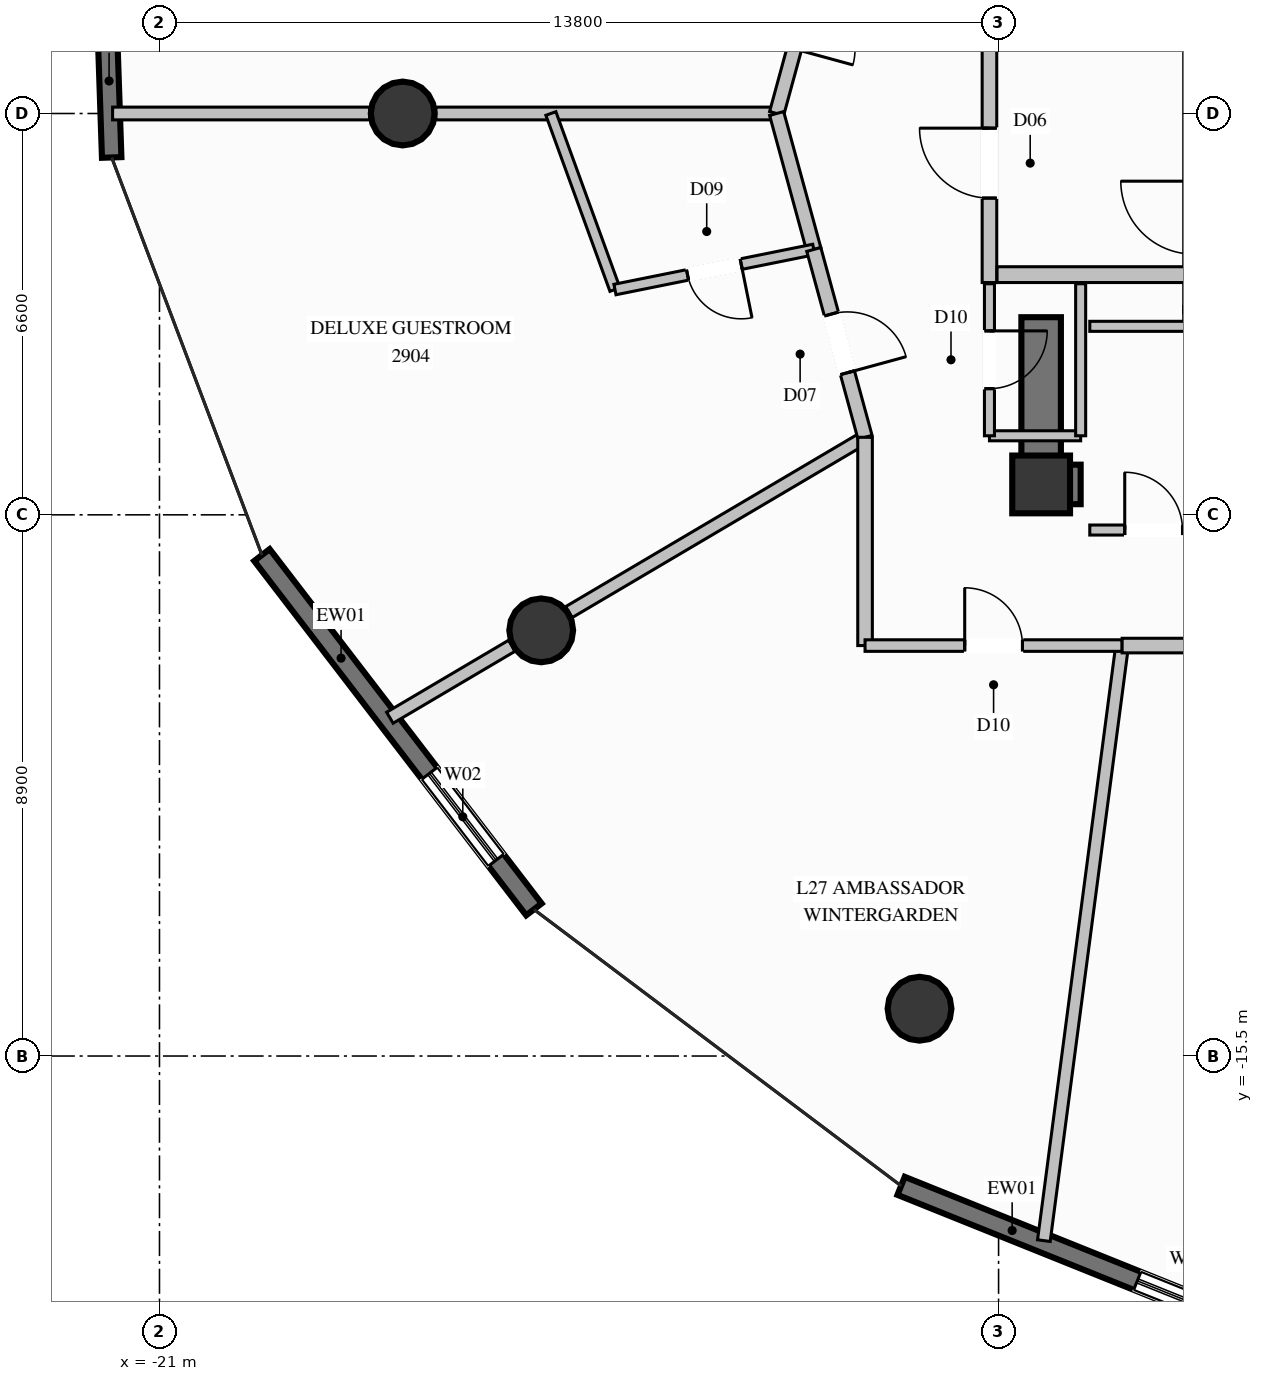
"""IFC4 building model, lengths in metres.
Left out: names, types, materials, properties, quantities, classifications, styles, units other than length and angle.
Written with IfcOpenShell. Run it as: python <this file> out.ifc"""

import sys

from ifc_helpers import new_model, si_unit, direction, frame, frame_2d, origin, origin_2d, place, context, subcontext, project, spatial, rectangle, circle, extrude, element, fill, save


model = new_model("IFC4")
c1 = context("Model", 3, precision=1e-05, world=origin(), true_north=direction((0.0, 1.0)))
c2 = subcontext(c1, "Body", "Model", "MODEL_VIEW")
j1 = project(units=[si_unit("LENGTHUNIT", "METRE"), si_unit("PLANEANGLEUNIT", "RADIAN")], contexts=[c1])
p1 = place(None, origin())
s1 = spatial("IfcSite", under=j1, at=p1, CompositionType="ELEMENT")
p2 = place(p1, origin())
s2 = spatial("IfcBuilding", under=s1, at=p2, CompositionType="ELEMENT")
p3 = place(p2, frame((0.0, 0.0, 109.8)))
s3 = spatial("IfcBuildingStorey", under=s2, at=p3, CompositionType="ELEMENT", Elevation=109.8)
p4 = place(p3, frame((-6.5, -6.1, 0.0), z_axis=(0.0, 0.0, 1.0), x_axis=(1.0, 0.0, 0.0)))
e1 = element("IfcColumn", 1, at=p4, inside=s3, PredefinedType="COLUMN", context=c2, shape_type="SweptSolid", body=[
    extrude(rectangle(XDim=0.95, YDim=0.95, at=origin_2d()), origin(), (0.0, 0.0, 1.0), 3.6),
])
p5 = place(p3, frame((-6.175, -6.1, 0.0), z_axis=(0.0, 0.0, 1.0), x_axis=(1.0, 0.0, 0.0)))
e2 = element("IfcWall", 2, at=p5, inside=s3, PredefinedType="SHEAR", context=c2, shape_type="SweptSolid", body=[
    extrude(rectangle(XDim=0.325, YDim=0.65, at=frame_2d((0.163, 0.0))), origin(), (0.0, 0.0, 1.0), 3.6),
])
p6 = place(p3, frame((-6.5, -6.425, 0.0), z_axis=(0.0, 0.0, 1.0), x_axis=(0.0, 1.0, 0.0)))
e3 = element("IfcWall", 3, at=p6, inside=s3, PredefinedType="SHEAR", context=c2, shape_type="SweptSolid", body=[
    extrude(rectangle(XDim=3.075, YDim=0.65, at=frame_2d((1.538, 0.0))), origin(), (0.0, 0.0, 1.0), 3.6),
])
for number, where, z_axis, x_axis in (
    (4, (-17.0, 0.0, 0.0), (0.0, 0.0, 1.0), (1.0, 0.0, 0.0)),
    (5, (-14.722, -8.5, 0.0), (0.0, 0.0, 1.0), (1.0, 0.0, 0.0)),
    (6, (-8.5, -14.722, 0.0), (0.0, 0.0, 1.0), (1.0, 0.0, 0.0)),
):
    element("IfcColumn", number, at=place(p3, frame(where, z_axis=z_axis, x_axis=x_axis)), inside=s3, PredefinedType="COLUMN", context=c2, shape_type="SweptSolid", body=[
        extrude(circle(Radius=0.525, at=origin_2d()), origin(), (0.0, 0.0, 1.0), 3.6),
    ])
p7 = place(p3, frame((-21.786, -0.723, 0.0), z_axis=(0.0, 0.0, 1.0), x_axis=(-0.034040106065, 0.999420467661, 0.0)))
e7 = element("IfcWall", 7, at=p7, inside=s3, PredefinedType="SOLIDWALL", context=c2, shape_type="SweptSolid", body=[
    extrude(rectangle(XDim=6.613, YDim=0.32, at=frame_2d((3.306, 0.0))), origin(), (0.0, 0.0, 1.0), 3.35),
])
p8 = place(p7, frame((2.767, 0.0, 0.35)))
e8 = element("IfcOpeningElement", 8, at=p8, cuts=e7, PredefinedType="OPENING", context=c2, shape_type="SweptSolid", body=[
    extrude(rectangle(XDim=1.8, YDim=2.6, at=frame_2d((0.9, 1.3))), frame((0.0, 0.17, 0.0), z_axis=(0.0, -1.0, 0.0), x_axis=(1.0, 0.0, 0.0)), (0.0, 0.0, 1.0), 0.34),
])
p9 = place(p3, frame((-14.842, -13.089, 0.0), z_axis=(0.0, 0.0, 1.0), x_axis=(-0.608831916989, 0.793299247986, 0.0)))
e9 = element("IfcWall", 9, at=p9, inside=s3, PredefinedType="SOLIDWALL", context=c2, shape_type="SweptSolid", body=[
    extrude(rectangle(XDim=7.347, YDim=0.32, at=frame_2d((3.673, 0.0))), origin(), (0.0, 0.0, 1.0), 3.35),
])
p10 = place(p9, frame((1.021, 0.0, 0.35)))
e10 = element("IfcOpeningElement", 10, at=p10, cuts=e9, PredefinedType="OPENING", context=c2, shape_type="SweptSolid", body=[
    extrude(rectangle(XDim=1.8, YDim=2.6, at=frame_2d((0.9, 1.3))), frame((0.0, 0.17, 0.0), z_axis=(0.0, -1.0, 0.0), x_axis=(1.0, 0.0, 0.0)), (0.0, 0.0, 1.0), 0.34),
])
p11 = place(p3, frame((-1.79, -20.455, 0.0), z_axis=(0.0, 0.0, 1.0), x_axis=(-0.927795739468, 0.373088549577, 0.0)))
e11 = element("IfcWall", 11, at=p11, inside=s3, PredefinedType="SOLIDWALL", context=c2, shape_type="SweptSolid", body=[
    extrude(rectangle(XDim=7.559, YDim=0.32, at=frame_2d((3.779, 0.0))), origin(), (0.0, 0.0, 1.0), 3.35),
])
p12 = place(p11, frame((1.572, 0.0, 0.35)))
e12 = element("IfcOpeningElement", 12, at=p12, cuts=e11, PredefinedType="OPENING", context=c2, shape_type="SweptSolid", body=[
    extrude(rectangle(XDim=1.8, YDim=2.6, at=frame_2d((0.9, 1.3))), frame((0.0, 0.17, 0.0), z_axis=(0.0, -1.0, 0.0), x_axis=(1.0, 0.0, 0.0)), (0.0, 0.0, 1.0), 0.34),
])
p13 = place(p3, frame((-7.35, -2.78, 0.0), z_axis=(0.0, 0.0, 1.0), x_axis=(0.0, 1.0, 0.0)))
e13 = element("IfcWall", 13, at=p13, inside=s3, PredefinedType="PARTITIONING", context=c2, shape_type="SweptSolid", body=[
    extrude(rectangle(XDim=5.12, YDim=0.24, at=frame_2d((2.56, 0.0))), origin(), (0.0, 0.0, 1.0), 2.435),
])
p14 = place(p13, frame((1.389, 0.0, 0.0)))
e14 = element("IfcOpeningElement", 14, at=p14, cuts=e13, PredefinedType="OPENING", context=c2, shape_type="SweptSolid", body=[
    extrude(rectangle(XDim=1.15, YDim=2.2, at=frame_2d((0.575, 1.1))), frame((0.0, 0.13, 0.0), z_axis=(0.0, -1.0, 0.0), x_axis=(1.0, 0.0, 0.0)), (0.0, 0.0, 1.0), 0.26),
])
p15 = place(p3, frame((-7.225, -2.65, 0.0), z_axis=(0.0, 0.0, 1.0), x_axis=(1.0, 0.0, 0.0)))
e15 = element("IfcWall", 15, at=p15, inside=s3, PredefinedType="PARTITIONING", context=c2, shape_type="SweptSolid", body=[
    extrude(rectangle(XDim=3.095, YDim=0.26, at=frame_2d((1.548, 0.0))), origin(), (0.0, 0.0, 1.0), 3.35),
])
p16 = place(p3, frame((-7.35, -5.3, 0.0), z_axis=(0.0, 0.0, 1.0), x_axis=(1.0, 0.0, 0.0)))
e16 = element("IfcWall", 16, at=p16, inside=s3, PredefinedType="PARTITIONING", context=c2, shape_type="SweptSolid", body=[
    extrude(rectangle(XDim=1.5, YDim=0.165, at=frame_2d((0.75, 0.0))), origin(), (0.0, 0.0, 1.0), 2.435),
])
p17 = place(p3, frame((-5.85, -5.3, 0.0), z_axis=(0.0, 0.0, 1.0), x_axis=(0.0, 1.0, 0.0)))
e17 = element("IfcWall", 17, at=p17, inside=s3, PredefinedType="PARTITIONING", context=c2, shape_type="SweptSolid", body=[
    extrude(rectangle(XDim=2.5, YDim=0.165, at=frame_2d((1.25, 0.0))), origin(), (0.0, 0.0, 1.0), 2.435),
])
p18 = place(p3, frame((-7.35, -2.8, 0.0), z_axis=(0.0, 0.0, 1.0), x_axis=(0.0, -1.0, 0.0)))
e18 = element("IfcWall", 18, at=p18, inside=s3, PredefinedType="PARTITIONING", context=c2, shape_type="SweptSolid", body=[
    extrude(rectangle(XDim=2.5, YDim=0.165, at=frame_2d((1.25, 0.0))), origin(), (0.0, 0.0, 1.0), 3.35),
])
p19 = place(p18, frame((0.775, 0.0, 0.0)))
e19 = element("IfcOpeningElement", 19, at=p19, cuts=e18, PredefinedType="OPENING", context=c2, shape_type="SweptSolid", body=[
    extrude(rectangle(XDim=0.95, YDim=2.1, at=frame_2d((0.475, 1.05))), frame((0.0, 0.093, 0.0), z_axis=(0.0, -1.0, 0.0), x_axis=(1.0, 0.0, 0.0)), (0.0, 0.0, 1.0), 0.185),
])
p20 = place(p3, frame((-5.7, -6.85, 0.0), z_axis=(0.0, 0.0, 1.0), x_axis=(1.0, 0.0, 0.0)))
e20 = element("IfcWall", 20, at=p20, inside=s3, PredefinedType="PARTITIONING", context=c2, shape_type="SweptSolid", body=[
    extrude(rectangle(XDim=2.1, YDim=0.165, at=frame_2d((1.05, 0.0))), origin(), (0.0, 0.0, 1.0), 2.435),
])
p21 = place(p20, frame((0.575, 0.0, 0.0)))
e21 = element("IfcOpeningElement", 21, at=p21, cuts=e20, PredefinedType="OPENING", context=c2, shape_type="SweptSolid", body=[
    extrude(rectangle(XDim=0.95, YDim=2.1, at=frame_2d((0.475, 1.05))), frame((0.0, 0.093, 0.0), z_axis=(0.0, -1.0, 0.0), x_axis=(1.0, 0.0, 0.0)), (0.0, 0.0, 1.0), 0.185),
])
p22 = place(p3, frame((-3.6, -3.5, 0.0), z_axis=(0.0, 0.0, 1.0), x_axis=(-1.0, 0.0, 0.0)))
e22 = element("IfcWall", 22, at=p22, inside=s3, PredefinedType="PARTITIONING", context=c2, shape_type="SweptSolid", body=[
    extrude(rectangle(XDim=2.1, YDim=0.165, at=frame_2d((1.05, 0.0))), origin(), (0.0, 0.0, 1.0), 3.35),
])
p23 = place(p3, frame((-10.85, 0.0, 0.0), z_axis=(0.0, 0.0, 1.0), x_axis=(-1.0, 0.0, 0.0)))
e23 = element("IfcWall", 23, at=p23, inside=s3, PredefinedType="PARTITIONING", context=c2, shape_type="SweptSolid", body=[
    extrude(rectangle(XDim=5.605, YDim=0.21, at=frame_2d((2.802, 0.0))), origin(), (0.0, 0.0, 1.0), 3.35),
])
p24 = place(p3, frame((-17.545, 0.0, 0.0), z_axis=(0.0, 0.0, 1.0), x_axis=(-1.0, 0.0, 0.0)))
e24 = element("IfcWall", 24, at=p24, inside=s3, PredefinedType="PARTITIONING", context=c2, shape_type="SweptSolid", body=[
    extrude(rectangle(XDim=4.226, YDim=0.21, at=frame_2d((2.113, 0.0))), origin(), (0.0, 0.0, 1.0), 3.35),
])
p25 = place(p3, frame((-9.396, -5.325, 0.0), z_axis=(0.0, 0.0, 1.0), x_axis=(-0.861187639937, -0.508287171607, 0.0)))
e25 = element("IfcWall", 25, at=p25, inside=s3, PredefinedType="PARTITIONING", context=c2, shape_type="SweptSolid", body=[
    extrude(rectangle(XDim=5.656, YDim=0.21, at=frame_2d((2.828, 0.0))), origin(), (0.0, 0.0, 1.0), 2.791),
])
p26 = place(p3, frame((-15.205, -8.753, 0.0), z_axis=(0.0, 0.0, 1.0), x_axis=(-0.861151801863, -0.508347886932, 0.0)))
e26 = element("IfcWall", 26, at=p26, inside=s3, PredefinedType="PARTITIONING", context=c2, shape_type="SweptSolid", body=[
    extrude(rectangle(XDim=2.329, YDim=0.21, at=frame_2d((1.165, 0.0))), origin(), (0.0, 0.0, 1.0), 3.35),
])
p27 = place(p3, frame((-10.007, 3.089, 0.0), z_axis=(0.0, 0.0, 1.0), x_axis=(-0.263272237376, -0.964721581093, 0.0)))
e27 = element("IfcWall", 27, at=p27, inside=s3, PredefinedType="PARTITIONING", context=c2, shape_type="SweptSolid", body=[
    extrude(rectangle(XDim=3.202, YDim=0.24, at=frame_2d((1.601, 0.0))), origin(), (0.0, 0.0, 1.0), 3.35),
])
p28 = place(p27, frame((1.101, 0.0, 0.0)))
e28 = element("IfcOpeningElement", 28, at=p28, cuts=e27, PredefinedType="OPENING", context=c2, shape_type="SweptSolid", body=[
    extrude(rectangle(XDim=1.0, YDim=2.2, at=frame_2d((0.5, 1.1))), frame((0.0, 0.13, 0.0), z_axis=(0.0, -1.0, 0.0), x_axis=(1.0, 0.0, 0.0)), (0.0, 0.0, 1.0), 0.26),
])
p29 = place(p3, frame((-10.85, 0.0, 0.0), z_axis=(0.0, 0.0, 1.0), x_axis=(0.263616426241, -0.964627586074, 0.0)))
e29 = element("IfcWall", 29, at=p29, inside=s3, PredefinedType="PARTITIONING", context=c2, shape_type="SweptSolid", body=[
    extrude(rectangle(XDim=2.318, YDim=0.24, at=frame_2d((1.159, 0.0))), origin(), (0.0, 0.0, 1.0), 3.35),
])
p30 = place(p3, frame((-14.563, 0.0, 0.0), z_axis=(0.0, 0.0, 1.0), x_axis=(0.342092982083, -0.939666106449, 0.0)))
e30 = element("IfcWall", 30, at=p30, inside=s3, PredefinedType="PLUMBINGWALL", context=c2, shape_type="SweptSolid", body=[
    extrude(rectangle(XDim=3.081, YDim=0.175, at=frame_2d((1.541, 0.0))), origin(), (0.0, 0.0, 1.0), 3.35),
])
p31 = place(p3, frame((-10.239, -2.236, 0.0), z_axis=(0.0, 0.0, 1.0), x_axis=(-0.980295333609, -0.197537487338, 0.0)))
e31 = element("IfcWall", 31, at=p31, inside=s3, PredefinedType="PLUMBINGWALL", context=c2, shape_type="SweptSolid", body=[
    extrude(rectangle(XDim=3.336, YDim=0.175, at=frame_2d((1.668, 0.0))), origin(), (0.0, 0.0, 1.0), 3.35),
])
p32 = place(p31, frame((1.218, 0.0, 0.0)))
e32 = element("IfcOpeningElement", 32, at=p32, cuts=e31, PredefinedType="OPENING", context=c2, shape_type="SweptSolid", body=[
    extrude(rectangle(XDim=0.9, YDim=2.1, at=frame_2d((0.45, 1.05))), frame((0.0, 0.098, 0.0), z_axis=(0.0, -1.0, 0.0), x_axis=(1.0, 0.0, 0.0)), (0.0, 0.0, 1.0), 0.195),
])
p33 = place(p3, frame((-10.239, -2.236, 0.0), z_axis=(0.0, 0.0, 1.0), x_axis=(0.26329160366, -0.964716295831, 0.0)))
e33 = element("IfcWall", 33, at=p33, inside=s3, PredefinedType="PARTITIONING", context=c2, shape_type="SweptSolid", body=[
    extrude(rectangle(XDim=3.202, YDim=0.24, at=frame_2d((1.601, 0.0))), origin(), (0.0, 0.0, 1.0), 3.35),
])
p34 = place(p33, frame((1.101, 0.0, 0.0)))
e34 = element("IfcOpeningElement", 34, at=p34, cuts=e33, PredefinedType="OPENING", context=c2, shape_type="SweptSolid", body=[
    extrude(rectangle(XDim=1.0, YDim=2.2, at=frame_2d((0.5, 1.1))), frame((0.0, 0.13, 0.0), z_axis=(0.0, -1.0, 0.0), x_axis=(1.0, 0.0, 0.0)), (0.0, 0.0, 1.0), 0.26),
])
p35 = place(p3, frame((-5.168, -8.75, 0.0), z_axis=(0.0, 0.0, 1.0), x_axis=(-0.130403964366, -0.991460945311, 0.0)))
e35 = element("IfcWall", 35, at=p35, inside=s3, PredefinedType="PARTITIONING", context=c2, shape_type="SweptSolid", body=[
    extrude(rectangle(XDim=9.87, YDim=0.21, at=frame_2d((4.935, 0.0))), origin(), (0.0, 0.0, 1.0), 3.35),
])
p36 = place(p3, frame((-9.396, -5.325, 0.0), z_axis=(0.0, 0.0, 1.0), x_axis=(0.0, -1.0, 0.0)))
e36 = element("IfcWall", 36, at=p36, inside=s3, PredefinedType="PARTITIONING", context=c2, shape_type="SweptSolid", body=[
    extrude(rectangle(XDim=3.425, YDim=0.24, at=frame_2d((1.712, 0.0))), origin(), (0.0, 0.0, 1.0), 3.35),
])
p37 = place(p3, frame((-9.396, -8.75, 0.0), z_axis=(0.0, 0.0, 1.0), x_axis=(1.0, 0.0, 0.0)))
e37 = element("IfcWall", 37, at=p37, inside=s3, PredefinedType="PARTITIONING", context=c2, shape_type="SweptSolid", body=[
    extrude(rectangle(XDim=4.228, YDim=0.19, at=frame_2d((2.114, 0.0))), origin(), (0.0, 0.0, 1.0), 3.35),
])
p38 = place(p37, frame((1.639, 0.0, 0.0)))
e38 = element("IfcOpeningElement", 38, at=p38, cuts=e37, PredefinedType="OPENING", context=c2, shape_type="SweptSolid", body=[
    extrude(rectangle(XDim=0.95, YDim=2.1, at=frame_2d((0.475, 1.05))), frame((0.0, 0.105, 0.0), z_axis=(0.0, -1.0, 0.0), x_axis=(1.0, 0.0, 0.0)), (0.0, 0.0, 1.0), 0.21),
])
p39 = place(p3, frame((-5.168, -8.75, 0.0), z_axis=(0.0, 0.0, 1.0), x_axis=(1.0, 0.0, 0.0)))
e39 = element("IfcWall", 39, at=p39, inside=s3, PredefinedType="PARTITIONING", context=c2, shape_type="SweptSolid", body=[
    extrude(rectangle(XDim=5.168, YDim=0.24, at=frame_2d((2.584, 0.0))), origin(), (0.0, 0.0, 1.0), 3.35),
])
p40 = place(p10, origin())
e40 = element("IfcWindow", 40, at=p40, inside=s3, PartitioningType="SINGLE_PANEL", PredefinedType="WINDOW", context=c2, shape_type="SweptSolid", body=[
    extrude(rectangle(XDim=1.8, YDim=2.6, at=frame_2d((0.9, 1.3))), frame((0.0, 0.03, 0.0), z_axis=(0.0, -1.0, 0.0), x_axis=(1.0, 0.0, 0.0)), (0.0, 0.0, 1.0), 0.06),
])
fill(e10, e40)
p41 = place(p12, origin())
e41 = element("IfcWindow", 41, at=p41, inside=s3, PartitioningType="SINGLE_PANEL", PredefinedType="WINDOW", context=c2, shape_type="SweptSolid", body=[
    extrude(rectangle(XDim=1.8, YDim=2.6, at=frame_2d((0.9, 1.3))), frame((0.0, 0.03, 0.0), z_axis=(0.0, -1.0, 0.0), x_axis=(1.0, 0.0, 0.0)), (0.0, 0.0, 1.0), 0.06),
])
fill(e12, e41)
p42 = place(p14, origin())
e42 = element("IfcDoor", 42, at=p42, inside=s3, OperationType="SINGLE_SWING_RIGHT", PredefinedType="DOOR", context=c2, shape_type="SweptSolid", body=[
    extrude(rectangle(XDim=1.15, YDim=2.2, at=frame_2d((0.575, 1.1))), frame((0.0, 0.025, 0.0), z_axis=(0.0, -1.0, 0.0), x_axis=(1.0, 0.0, 0.0)), (0.0, 0.0, 1.0), 0.05),
])
fill(e14, e42)
p43 = place(p19, origin())
e43 = element("IfcDoor", 43, at=p43, inside=s3, OperationType="SINGLE_SWING_LEFT", PredefinedType="DOOR", context=c2, shape_type="SweptSolid", body=[
    extrude(rectangle(XDim=0.95, YDim=2.1, at=frame_2d((0.475, 1.05))), frame((0.0, 0.025, 0.0), z_axis=(0.0, -1.0, 0.0), x_axis=(1.0, 0.0, 0.0)), (0.0, 0.0, 1.0), 0.05),
])
fill(e19, e43)
p44 = place(p21, origin())
e44 = element("IfcDoor", 44, at=p44, inside=s3, OperationType="SINGLE_SWING_LEFT", PredefinedType="DOOR", context=c2, shape_type="SweptSolid", body=[
    extrude(rectangle(XDim=0.95, YDim=2.1, at=frame_2d((0.475, 1.05))), frame((0.0, 0.025, 0.0), z_axis=(0.0, -1.0, 0.0), x_axis=(1.0, 0.0, 0.0)), (0.0, 0.0, 1.0), 0.05),
])
fill(e21, e44)
p45 = place(p32, origin())
e45 = element("IfcDoor", 45, at=p45, inside=s3, OperationType="SINGLE_SWING_LEFT", PredefinedType="DOOR", context=c2, shape_type="SweptSolid", body=[
    extrude(rectangle(XDim=0.9, YDim=2.1, at=frame_2d((0.45, 1.05))), frame((0.0, 0.025, 0.0), z_axis=(0.0, -1.0, 0.0), x_axis=(1.0, 0.0, 0.0)), (0.0, 0.0, 1.0), 0.05),
])
fill(e32, e45)
p46 = place(p34, origin())
e46 = element("IfcDoor", 46, at=p46, inside=s3, OperationType="SINGLE_SWING_RIGHT", PredefinedType="DOOR", context=c2, shape_type="SweptSolid", body=[
    extrude(rectangle(XDim=1.0, YDim=2.2, at=frame_2d((0.5, 1.1))), frame((0.0, 0.025, 0.0), z_axis=(0.0, -1.0, 0.0), x_axis=(1.0, 0.0, 0.0)), (0.0, 0.0, 1.0), 0.05),
])
fill(e34, e46)
p47 = place(p38, origin())
e47 = element("IfcDoor", 47, at=p47, inside=s3, OperationType="SINGLE_SWING_LEFT", PredefinedType="DOOR", context=c2, shape_type="SweptSolid", body=[
    extrude(rectangle(XDim=0.95, YDim=2.1, at=frame_2d((0.475, 1.05))), frame((0.0, 0.025, 0.0), z_axis=(0.0, -1.0, 0.0), x_axis=(1.0, 0.0, 0.0)), (0.0, 0.0, 1.0), 0.05),
])
fill(e38, e47)
save(model, sys.argv[1])
